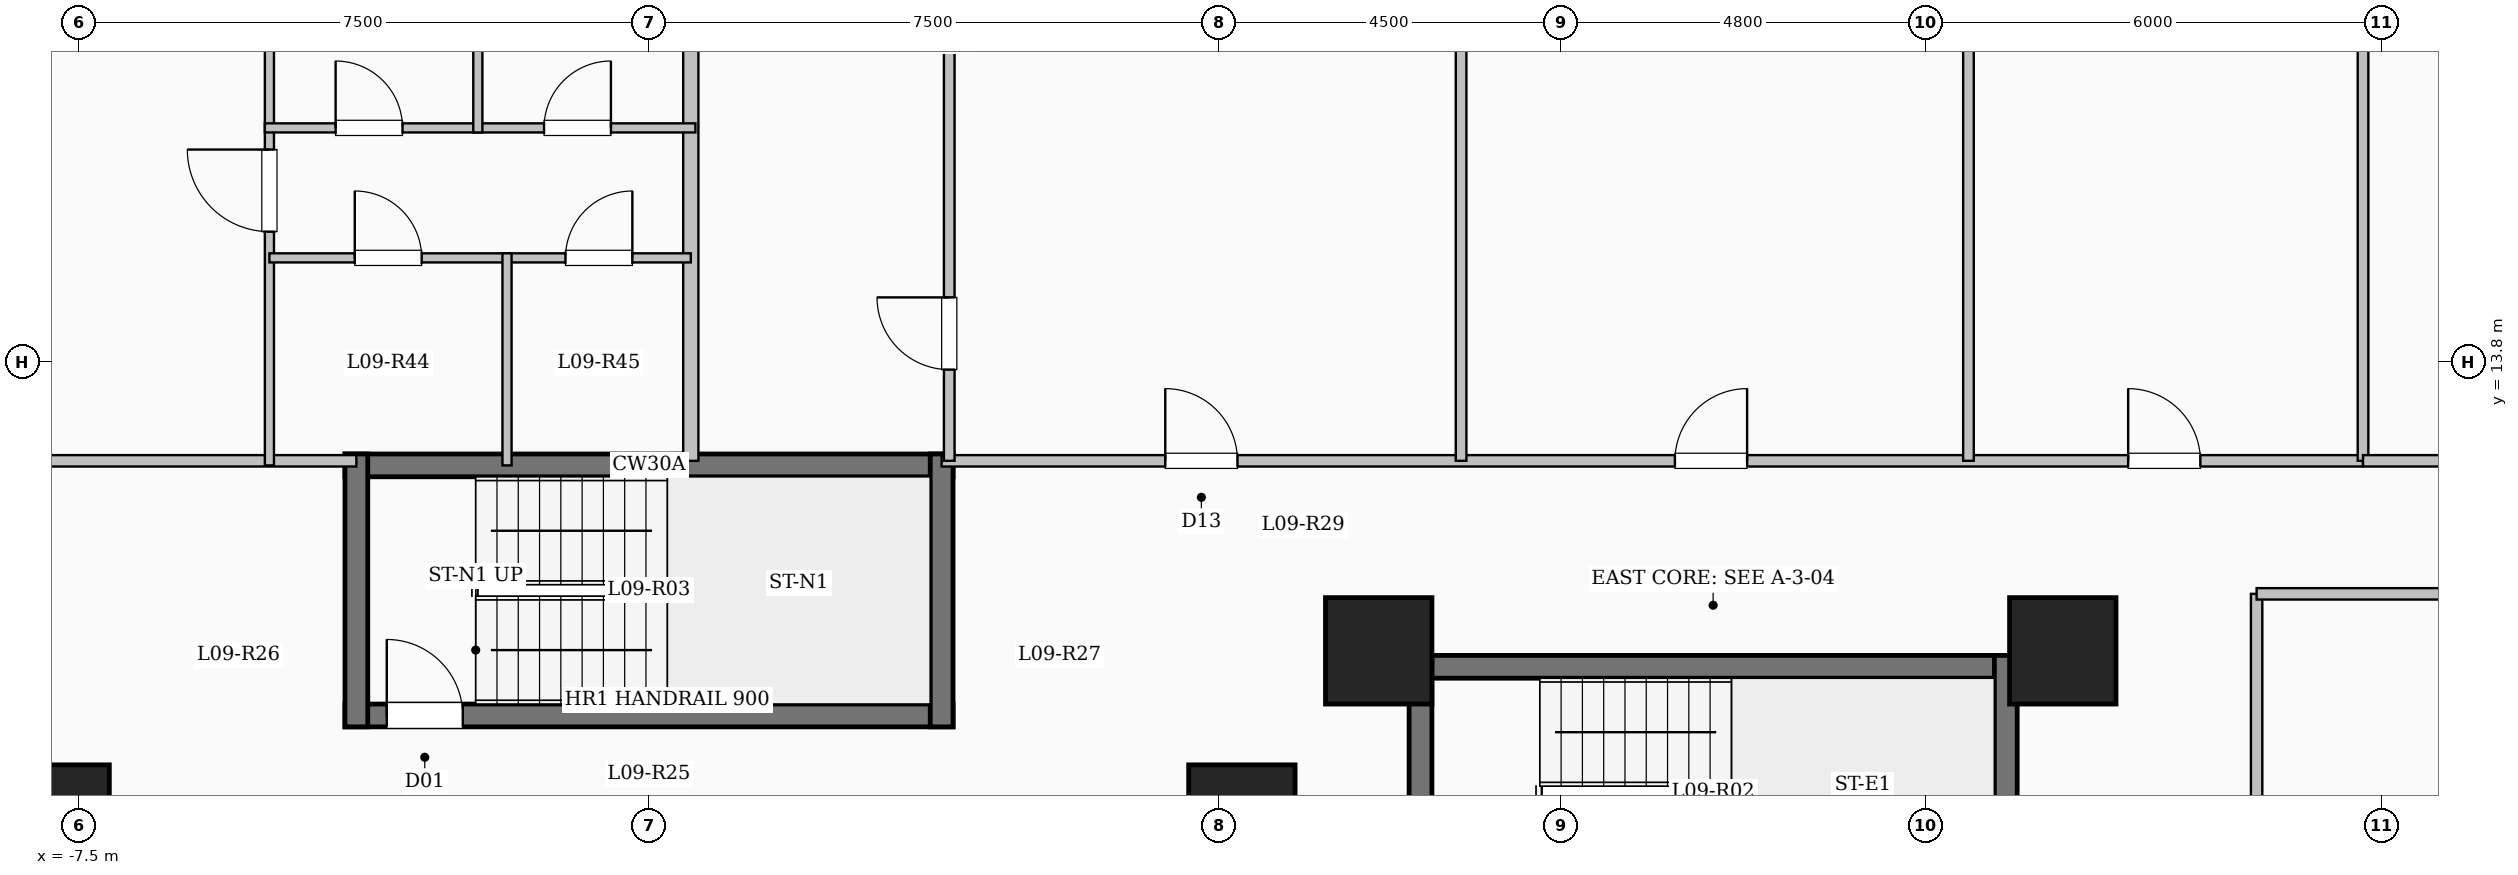
"""IFC4 building model, lengths in metres.
Left out: names, types, materials, properties, quantities, classifications, styles, units other than length and angle.
Written with IfcOpenShell. Run it as: python <this file> out.ifc"""

import sys

from ifc_helpers import new_model, si_unit, direction, frame, frame_2d, origin, origin_2d, place, context, subcontext, project, spatial, rectangle, extrude, element, fill, save


model = new_model("IFC4")
c1 = context("Model", 3, precision=1e-05, world=origin(), true_north=direction((0.0, 1.0)))
c2 = subcontext(c1, "Body", "Model", "MODEL_VIEW")
j1 = project(units=[si_unit("LENGTHUNIT", "METRE"), si_unit("PLANEANGLEUNIT", "RADIAN")], contexts=[c1])
p1 = place(None, origin())
s1 = spatial("IfcSite", under=j1, at=p1, CompositionType="ELEMENT")
p2 = place(p1, origin())
s2 = spatial("IfcBuilding", under=s1, at=p2, CompositionType="ELEMENT")
p3 = place(p2, frame((0.0, 0.0, 37.4)))
s3 = spatial("IfcBuildingStorey", under=s2, at=p3, CompositionType="ELEMENT", Elevation=37.4)
for number, where, z_axis, x_axis in (
    (1, (-7.8, 7.8, 0.0), (0.0, 0.0, 1.0), (1.0, 0.0, 0.0)),
    (2, (7.8, 7.8, 0.0), (0.0, 0.0, 1.0), (1.0, 0.0, 0.0)),
    (3, (9.6, 10.0, 0.0), (0.0, 0.0, 1.0), (1.0, 0.0, 0.0)),
    (4, (18.6, 10.0, 0.0), (0.0, 0.0, 1.0), (1.0, 0.0, 0.0)),
):
    element("IfcColumn", number, at=place(p3, frame(where, z_axis=z_axis, x_axis=x_axis)), inside=s3, PredefinedType="COLUMN", context=c2, shape_type="SweptSolid", body=[
        extrude(rectangle(XDim=1.4, YDim=1.4, at=origin_2d()), origin(), (0.0, 0.0, 1.0), 3.35),
    ])
p4 = place(p3, frame((10.0, 9.79, 0.0), z_axis=(0.0, 0.0, 1.0), x_axis=(1.0, 0.0, 0.0)))
e5 = element("IfcWall", 5, at=p4, inside=s3, PredefinedType="SHEAR", context=c2, shape_type="SweptSolid", body=[
    extrude(rectangle(XDim=8.0, YDim=0.3, at=frame_2d((4.0, 0.0))), origin(), (0.0, 0.0, 1.0), 3.35),
])
for number, where, z_axis, x_axis in (
    (6, (10.15, 6.35, 0.0), (0.0, 0.0, 1.0), (0.0, 1.0, 0.0)),
    (7, (17.85, 6.35, 0.0), (0.0, 0.0, 1.0), (0.0, 1.0, 0.0)),
):
    element("IfcWall", number, at=place(p3, frame(where, z_axis=z_axis, x_axis=x_axis)), inside=s3, PredefinedType="SHEAR", context=c2, shape_type="SweptSolid", body=[
        extrude(rectangle(XDim=3.59, YDim=0.3, at=frame_2d((1.795, 0.0))), origin(), (0.0, 0.0, 1.0), 3.35),
    ])
p5 = place(p3, frame((-4.0, 12.44, 0.0), z_axis=(0.0, 0.0, 1.0), x_axis=(1.0, 0.0, 0.0)))
e8 = element("IfcWall", 8, at=p5, inside=s3, PredefinedType="SHEAR", context=c2, shape_type="SweptSolid", body=[
    extrude(rectangle(XDim=8.0, YDim=0.3, at=frame_2d((4.0, 0.0))), origin(), (0.0, 0.0, 1.0), 3.35),
])
p6 = place(p3, frame((-4.0, 9.15, 0.0), z_axis=(0.0, 0.0, 1.0), x_axis=(1.0, 0.0, 0.0)))
e9 = element("IfcWall", 9, at=p6, inside=s3, PredefinedType="SHEAR", context=c2, shape_type="SweptSolid", body=[
    extrude(rectangle(XDim=8.0, YDim=0.3, at=frame_2d((4.0, 0.0))), origin(), (0.0, 0.0, 1.0), 3.35),
])
p7 = place(p6, frame((0.55, 0.0, 0.0)))
e10 = element("IfcOpeningElement", 10, at=p7, cuts=e9, PredefinedType="OPENING", context=c2, shape_type="SweptSolid", body=[
    extrude(rectangle(XDim=1.0, YDim=2.15, at=frame_2d((0.5, 1.075))), frame((0.0, 0.16, 0.0), z_axis=(0.0, -1.0, 0.0), x_axis=(1.0, 0.0, 0.0)), (0.0, 0.0, 1.0), 0.32),
])
for number, where, z_axis, x_axis in (
    (11, (-3.85, 9.0, 0.0), (0.0, 0.0, 1.0), (0.0, 1.0, 0.0)),
    (12, (3.85, 9.0, 0.0), (0.0, 0.0, 1.0), (0.0, 1.0, 0.0)),
):
    element("IfcWall", number, at=place(p3, frame(where, z_axis=z_axis, x_axis=x_axis)), inside=s3, PredefinedType="SHEAR", context=c2, shape_type="SweptSolid", body=[
        extrude(rectangle(XDim=3.59, YDim=0.3, at=frame_2d((1.795, 0.0))), origin(), (0.0, 0.0, 1.0), 3.35),
    ])
p8 = place(p3, frame((-22.55, 12.5, 0.0), z_axis=(0.0, 0.0, 1.0), x_axis=(1.0, 0.0, 0.0)))
e13 = element("IfcWall", 13, at=p8, inside=s3, PredefinedType="PARTITIONING", context=c2, shape_type="SweptSolid", body=[
    extrude(rectangle(XDim=18.7, YDim=0.15, at=frame_2d((9.35, 0.0))), origin(), (0.0, 0.0, 1.0), 3.1),
])
p9 = place(p8, frame((0.7, 0.0, 0.0)))
e14 = element("IfcOpeningElement", 14, at=p9, cuts=e13, PredefinedType="OPENING", context=c2, shape_type="SweptSolid", body=[
    extrude(rectangle(XDim=0.96, YDim=2.15, at=frame_2d((0.48, 1.075))), frame((0.0, 0.085, 0.0), z_axis=(0.0, -1.0, 0.0), x_axis=(1.0, 0.0, 0.0)), (0.0, 0.0, 1.0), 0.17),
])
p10 = place(p8, frame((13.162, 0.0, 0.0)))
e15 = element("IfcOpeningElement", 15, at=p10, cuts=e13, PredefinedType="OPENING", context=c2, shape_type="SweptSolid", body=[
    extrude(rectangle(XDim=0.96, YDim=2.15, at=frame_2d((0.48, 1.075))), frame((0.0, 0.085, 0.0), z_axis=(0.0, -1.0, 0.0), x_axis=(1.0, 0.0, 0.0)), (0.0, 0.0, 1.0), 0.17),
])
p11 = place(p3, frame((3.85, 12.5, 0.0), z_axis=(0.0, 0.0, 1.0), x_axis=(1.0, 0.0, 0.0)))
e16 = element("IfcWall", 16, at=p11, inside=s3, PredefinedType="PARTITIONING", context=c2, shape_type="SweptSolid", body=[
    extrude(rectangle(XDim=18.7, YDim=0.15, at=frame_2d((9.35, 0.0))), origin(), (0.0, 0.0, 1.0), 3.1),
])
p12 = place(p11, frame((2.942, 0.0, 0.0)))
e17 = element("IfcOpeningElement", 17, at=p12, cuts=e16, PredefinedType="OPENING", context=c2, shape_type="SweptSolid", body=[
    extrude(rectangle(XDim=0.95, YDim=2.15, at=frame_2d((0.475, 1.075))), frame((0.0, 0.085, 0.0), z_axis=(0.0, -1.0, 0.0), x_axis=(1.0, 0.0, 0.0)), (0.0, 0.0, 1.0), 0.17),
])
p13 = place(p11, frame((9.647, 0.0, 0.0)))
e18 = element("IfcOpeningElement", 18, at=p13, cuts=e16, PredefinedType="OPENING", context=c2, shape_type="SweptSolid", body=[
    extrude(rectangle(XDim=0.95, YDim=2.15, at=frame_2d((0.475, 1.075))), frame((0.0, 0.085, 0.0), z_axis=(0.0, -1.0, 0.0), x_axis=(1.0, 0.0, 0.0)), (0.0, 0.0, 1.0), 0.17),
])
p14 = place(p11, frame((15.61, 0.0, 0.0)))
e19 = element("IfcOpeningElement", 19, at=p14, cuts=e16, PredefinedType="OPENING", context=c2, shape_type="SweptSolid", body=[
    extrude(rectangle(XDim=0.95, YDim=2.15, at=frame_2d((0.475, 1.075))), frame((0.0, 0.085, 0.0), z_axis=(0.0, -1.0, 0.0), x_axis=(1.0, 0.0, 0.0)), (0.0, 0.0, 1.0), 0.17),
])
p15 = place(p3, frame((21.15, -7.25, 0.0), z_axis=(0.0, 0.0, 1.0), x_axis=(0.0, 1.0, 0.0)))
e20 = element("IfcWall", 20, at=p15, inside=s3, PredefinedType="PARTITIONING", context=c2, shape_type="SweptSolid", body=[
    extrude(rectangle(XDim=18.0, YDim=0.15, at=frame_2d((9.0, 0.0))), origin(), (0.0, 0.0, 1.0), 2.585),
])
p16 = place(p3, frame((0.55, 12.5, 0.0), z_axis=(0.0, 0.0, 1.0), x_axis=(0.0, 1.0, 0.0)))
e21 = element("IfcWall", 21, at=p16, inside=s3, PredefinedType="SOLIDWALL", context=c2, shape_type="SweptSolid", body=[
    extrude(rectangle(XDim=12.58, YDim=0.2, at=frame_2d((6.29, 0.0))), origin(), (0.0, 0.0, 1.0), 3.1),
])
p17 = place(p3, frame((-4.994, 12.44, 0.0), z_axis=(0.0, 0.0, 1.0), x_axis=(0.0, 1.0, 0.0)))
e22 = element("IfcWall", 22, at=p17, inside=s3, PredefinedType="PARTITIONING", context=c2, shape_type="SweptSolid", body=[
    extrude(rectangle(XDim=12.64, YDim=0.12, at=frame_2d((6.32, 0.0))), origin(), (0.0, 0.0, 1.0), 3.1),
])
p18 = place(p17, frame((3.075, 0.0, 0.0)))
e23 = element("IfcOpeningElement", 23, at=p18, cuts=e22, PredefinedType="OPENING", context=c2, shape_type="SweptSolid", body=[
    extrude(rectangle(XDim=1.08, YDim=2.15, at=frame_2d((0.54, 1.075))), frame((0.0, 0.07, 0.0), z_axis=(0.0, -1.0, 0.0), x_axis=(1.0, 0.0, 0.0)), (0.0, 0.0, 1.0), 0.14),
])
p19 = place(p3, frame((-4.994, 15.17, 0.0), z_axis=(0.0, 0.0, 1.0), x_axis=(1.0, 0.0, 0.0)))
e24 = element("IfcWall", 24, at=p19, inside=s3, PredefinedType="PARTITIONING", context=c2, shape_type="SweptSolid", body=[
    extrude(rectangle(XDim=3.126, YDim=0.12, at=frame_2d((1.563, 0.0))), origin(), (0.0, 0.0, 1.0), 3.1),
])
p20 = place(p19, frame((1.123, 0.0, 0.0)))
e25 = element("IfcOpeningElement", 25, at=p20, cuts=e24, PredefinedType="OPENING", context=c2, shape_type="SweptSolid", body=[
    extrude(rectangle(XDim=0.88, YDim=2.1, at=frame_2d((0.44, 1.05))), frame((0.0, 0.07, 0.0), z_axis=(0.0, -1.0, 0.0), x_axis=(1.0, 0.0, 0.0)), (0.0, 0.0, 1.0), 0.14),
])
p21 = place(p3, frame((-1.868, 15.17, 0.0), z_axis=(0.0, 0.0, 1.0), x_axis=(1.0, 0.0, 0.0)))
e26 = element("IfcWall", 26, at=p21, inside=s3, PredefinedType="PARTITIONING", context=c2, shape_type="SweptSolid", body=[
    extrude(rectangle(XDim=2.418, YDim=0.12, at=frame_2d((1.209, 0.0))), origin(), (0.0, 0.0, 1.0), 3.1),
])
p22 = place(p21, frame((0.769, 0.0, 0.0)))
e27 = element("IfcOpeningElement", 27, at=p22, cuts=e26, PredefinedType="OPENING", context=c2, shape_type="SweptSolid", body=[
    extrude(rectangle(XDim=0.88, YDim=2.1, at=frame_2d((0.44, 1.05))), frame((0.0, 0.07, 0.0), z_axis=(0.0, -1.0, 0.0), x_axis=(1.0, 0.0, 0.0)), (0.0, 0.0, 1.0), 0.14),
])
p23 = place(p3, frame((-5.054, 16.88, 0.0), z_axis=(0.0, 0.0, 1.0), x_axis=(1.0, 0.0, 0.0)))
e28 = element("IfcWall", 28, at=p23, inside=s3, PredefinedType="PARTITIONING", context=c2, shape_type="SweptSolid", body=[
    extrude(rectangle(XDim=5.664, YDim=0.12, at=frame_2d((2.832, 0.0))), origin(), (0.0, 0.0, 1.0), 3.1),
])
p24 = place(p23, frame((0.931, 0.0, 0.0)))
e29 = element("IfcOpeningElement", 29, at=p24, cuts=e28, PredefinedType="OPENING", context=c2, shape_type="SweptSolid", body=[
    extrude(rectangle(XDim=0.88, YDim=2.1, at=frame_2d((0.44, 1.05))), frame((0.0, 0.07, 0.0), z_axis=(0.0, -1.0, 0.0), x_axis=(1.0, 0.0, 0.0)), (0.0, 0.0, 1.0), 0.14),
])
p25 = place(p23, frame((3.673, 0.0, 0.0)))
e30 = element("IfcOpeningElement", 30, at=p25, cuts=e28, PredefinedType="OPENING", context=c2, shape_type="SweptSolid", body=[
    extrude(rectangle(XDim=0.88, YDim=2.1, at=frame_2d((0.44, 1.05))), frame((0.0, 0.07, 0.0), z_axis=(0.0, -1.0, 0.0), x_axis=(1.0, 0.0, 0.0)), (0.0, 0.0, 1.0), 0.14),
])
p26 = place(p3, frame((-1.868, 12.44, 0.0), z_axis=(0.0, 0.0, 1.0), x_axis=(0.0, 1.0, 0.0)))
e31 = element("IfcWall", 31, at=p26, inside=s3, PredefinedType="PARTITIONING", context=c2, shape_type="SweptSolid", body=[
    extrude(rectangle(XDim=2.79, YDim=0.12, at=frame_2d((1.395, 0.0))), origin(), (0.0, 0.0, 1.0), 3.1),
])
p27 = place(p3, frame((-2.252, 16.82, 0.0), z_axis=(0.0, 0.0, 1.0), x_axis=(0.0, 1.0, 0.0)))
e32 = element("IfcWall", 32, at=p27, inside=s3, PredefinedType="PARTITIONING", context=c2, shape_type="SweptSolid", body=[
    extrude(rectangle(XDim=8.26, YDim=0.12, at=frame_2d((4.13, 0.0))), origin(), (0.0, 0.0, 1.0), 3.1),
])
p28 = place(p3, frame((3.95, 12.5, 0.0), z_axis=(0.0, 0.0, 1.0), x_axis=(0.0, 1.0, 0.0)))
e33 = element("IfcWall", 33, at=p28, inside=s3, PredefinedType="PARTITIONING", context=c2, shape_type="SweptSolid", body=[
    extrude(rectangle(XDim=11.05, YDim=0.14, at=frame_2d((5.525, 0.0))), origin(), (0.0, 0.0, 1.0), 3.1),
])
p29 = place(p28, frame((1.2, 0.0, 0.0)))
e34 = element("IfcOpeningElement", 34, at=p29, cuts=e33, PredefinedType="OPENING", context=c2, shape_type="SweptSolid", body=[
    extrude(rectangle(XDim=0.95, YDim=2.15, at=frame_2d((0.475, 1.075))), frame((0.0, 0.08, 0.0), z_axis=(0.0, -1.0, 0.0), x_axis=(1.0, 0.0, 0.0)), (0.0, 0.0, 1.0), 0.16),
])
for number, where, z_axis, x_axis in (
    (35, (10.684, 12.5, 0.0), (0.0, 0.0, 1.0), (0.0, 1.0, 0.0)),
    (36, (17.359, 12.5, 0.0), (0.0, 0.0, 1.0), (0.0, 1.0, 0.0)),
):
    element("IfcWall", number, at=place(p3, frame(where, z_axis=z_axis, x_axis=x_axis)), inside=s3, PredefinedType="PARTITIONING", context=c2, shape_type="SweptSolid", body=[
        extrude(rectangle(XDim=11.05, YDim=0.14, at=frame_2d((5.525, 0.0))), origin(), (0.0, 0.0, 1.0), 3.1),
    ])
p30 = place(p3, frame((21.15, 10.75, 0.0), z_axis=(0.0, 0.0, 1.0), x_axis=(1.0, 0.0, 0.0)))
e37 = element("IfcWall", 37, at=p30, inside=s3, PredefinedType="PARTITIONING", context=c2, shape_type="SweptSolid", body=[
    extrude(rectangle(XDim=7.53, YDim=0.15, at=frame_2d((3.765, 0.0))), origin(), (0.0, 0.0, 1.0), 3.1),
])
p31 = place(p3, frame((22.55, 12.5, 0.0), z_axis=(0.0, 0.0, 1.0), x_axis=(0.0, 1.0, 0.0)))
e38 = element("IfcWall", 38, at=p31, inside=s3, PredefinedType="PARTITIONING", context=c2, shape_type="SweptSolid", body=[
    extrude(rectangle(XDim=6.55, YDim=0.14, at=frame_2d((3.275, 0.0))), origin(), (0.0, 0.0, 1.0), 3.1),
])
p32 = place(p3, frame((22.55, 12.5, 0.0), z_axis=(0.0, 0.0, 1.0), x_axis=(1.0, 0.0, 0.0)))
e39 = element("IfcWall", 39, at=p32, inside=s3, PredefinedType="PARTITIONING", context=c2, shape_type="SweptSolid", body=[
    extrude(rectangle(XDim=6.13, YDim=0.15, at=frame_2d((3.065, 0.0))), origin(), (0.0, 0.0, 1.0), 3.1),
])
p33 = place(p32, frame((2.59, 0.0, 0.0)))
e40 = element("IfcOpeningElement", 40, at=p33, cuts=e39, PredefinedType="OPENING", context=c2, shape_type="SweptSolid", body=[
    extrude(rectangle(XDim=0.95, YDim=2.15, at=frame_2d((0.475, 1.075))), frame((0.0, 0.085, 0.0), z_axis=(0.0, -1.0, 0.0), x_axis=(1.0, 0.0, 0.0)), (0.0, 0.0, 1.0), 0.17),
])
p34 = place(p7, origin())
e41 = element("IfcDoor", 41, at=p34, inside=s3, OperationType="SINGLE_SWING_LEFT", PredefinedType="DOOR", context=c2, shape_type="SweptSolid", body=[
    extrude(rectangle(XDim=1.0, YDim=2.15, at=frame_2d((0.5, 1.075))), frame((0.0, 0.025, 0.0), z_axis=(0.0, -1.0, 0.0), x_axis=(1.0, 0.0, 0.0)), (0.0, 0.0, 1.0), 0.05),
])
fill(e10, e41)
p35 = place(p18, origin())
e42 = element("IfcDoor", 42, at=p35, inside=s3, OperationType="SINGLE_SWING_RIGHT", PredefinedType="DOOR", context=c2, shape_type="SweptSolid", body=[
    extrude(rectangle(XDim=1.08, YDim=2.15, at=frame_2d((0.54, 1.075))), frame((0.0, 0.025, 0.0), z_axis=(0.0, -1.0, 0.0), x_axis=(1.0, 0.0, 0.0)), (0.0, 0.0, 1.0), 0.05),
])
fill(e23, e42)
p36 = place(p20, origin())
e43 = element("IfcDoor", 43, at=p36, inside=s3, OperationType="SINGLE_SWING_LEFT", PredefinedType="DOOR", context=c2, shape_type="SweptSolid", body=[
    extrude(rectangle(XDim=0.88, YDim=2.1, at=frame_2d((0.44, 1.05))), frame((0.0, 0.025, 0.0), z_axis=(0.0, -1.0, 0.0), x_axis=(1.0, 0.0, 0.0)), (0.0, 0.0, 1.0), 0.05),
])
fill(e25, e43)
p37 = place(p22, origin())
e44 = element("IfcDoor", 44, at=p37, inside=s3, OperationType="SINGLE_SWING_RIGHT", PredefinedType="DOOR", context=c2, shape_type="SweptSolid", body=[
    extrude(rectangle(XDim=0.88, YDim=2.1, at=frame_2d((0.44, 1.05))), frame((0.0, 0.025, 0.0), z_axis=(0.0, -1.0, 0.0), x_axis=(1.0, 0.0, 0.0)), (0.0, 0.0, 1.0), 0.05),
])
fill(e27, e44)
p38 = place(p24, origin())
e45 = element("IfcDoor", 45, at=p38, inside=s3, OperationType="SINGLE_SWING_LEFT", PredefinedType="DOOR", context=c2, shape_type="SweptSolid", body=[
    extrude(rectangle(XDim=0.88, YDim=2.1, at=frame_2d((0.44, 1.05))), frame((0.0, 0.025, 0.0), z_axis=(0.0, -1.0, 0.0), x_axis=(1.0, 0.0, 0.0)), (0.0, 0.0, 1.0), 0.05),
])
fill(e29, e45)
p39 = place(p25, origin())
e46 = element("IfcDoor", 46, at=p39, inside=s3, OperationType="SINGLE_SWING_RIGHT", PredefinedType="DOOR", context=c2, shape_type="SweptSolid", body=[
    extrude(rectangle(XDim=0.88, YDim=2.1, at=frame_2d((0.44, 1.05))), frame((0.0, 0.025, 0.0), z_axis=(0.0, -1.0, 0.0), x_axis=(1.0, 0.0, 0.0)), (0.0, 0.0, 1.0), 0.05),
])
fill(e30, e46)
p40 = place(p12, origin())
e47 = element("IfcDoor", 47, at=p40, inside=s3, OperationType="SINGLE_SWING_LEFT", PredefinedType="DOOR", context=c2, shape_type="SweptSolid", body=[
    extrude(rectangle(XDim=0.95, YDim=2.15, at=frame_2d((0.475, 1.075))), frame((0.0, 0.025, 0.0), z_axis=(0.0, -1.0, 0.0), x_axis=(1.0, 0.0, 0.0)), (0.0, 0.0, 1.0), 0.05),
])
fill(e17, e47)
p41 = place(p13, origin())
e48 = element("IfcDoor", 48, at=p41, inside=s3, OperationType="SINGLE_SWING_RIGHT", PredefinedType="DOOR", context=c2, shape_type="SweptSolid", body=[
    extrude(rectangle(XDim=0.95, YDim=2.15, at=frame_2d((0.475, 1.075))), frame((0.0, 0.025, 0.0), z_axis=(0.0, -1.0, 0.0), x_axis=(1.0, 0.0, 0.0)), (0.0, 0.0, 1.0), 0.05),
])
fill(e18, e48)
p42 = place(p14, origin())
e49 = element("IfcDoor", 49, at=p42, inside=s3, OperationType="SINGLE_SWING_LEFT", PredefinedType="DOOR", context=c2, shape_type="SweptSolid", body=[
    extrude(rectangle(XDim=0.95, YDim=2.15, at=frame_2d((0.475, 1.075))), frame((0.0, 0.025, 0.0), z_axis=(0.0, -1.0, 0.0), x_axis=(1.0, 0.0, 0.0)), (0.0, 0.0, 1.0), 0.05),
])
fill(e19, e49)
p43 = place(p29, origin())
e50 = element("IfcDoor", 50, at=p43, inside=s3, OperationType="SINGLE_SWING_RIGHT", PredefinedType="DOOR", context=c2, shape_type="SweptSolid", body=[
    extrude(rectangle(XDim=0.95, YDim=2.15, at=frame_2d((0.475, 1.075))), frame((0.0, 0.025, 0.0), z_axis=(0.0, -1.0, 0.0), x_axis=(1.0, 0.0, 0.0)), (0.0, 0.0, 1.0), 0.05),
])
fill(e34, e50)
save(model, sys.argv[1])
